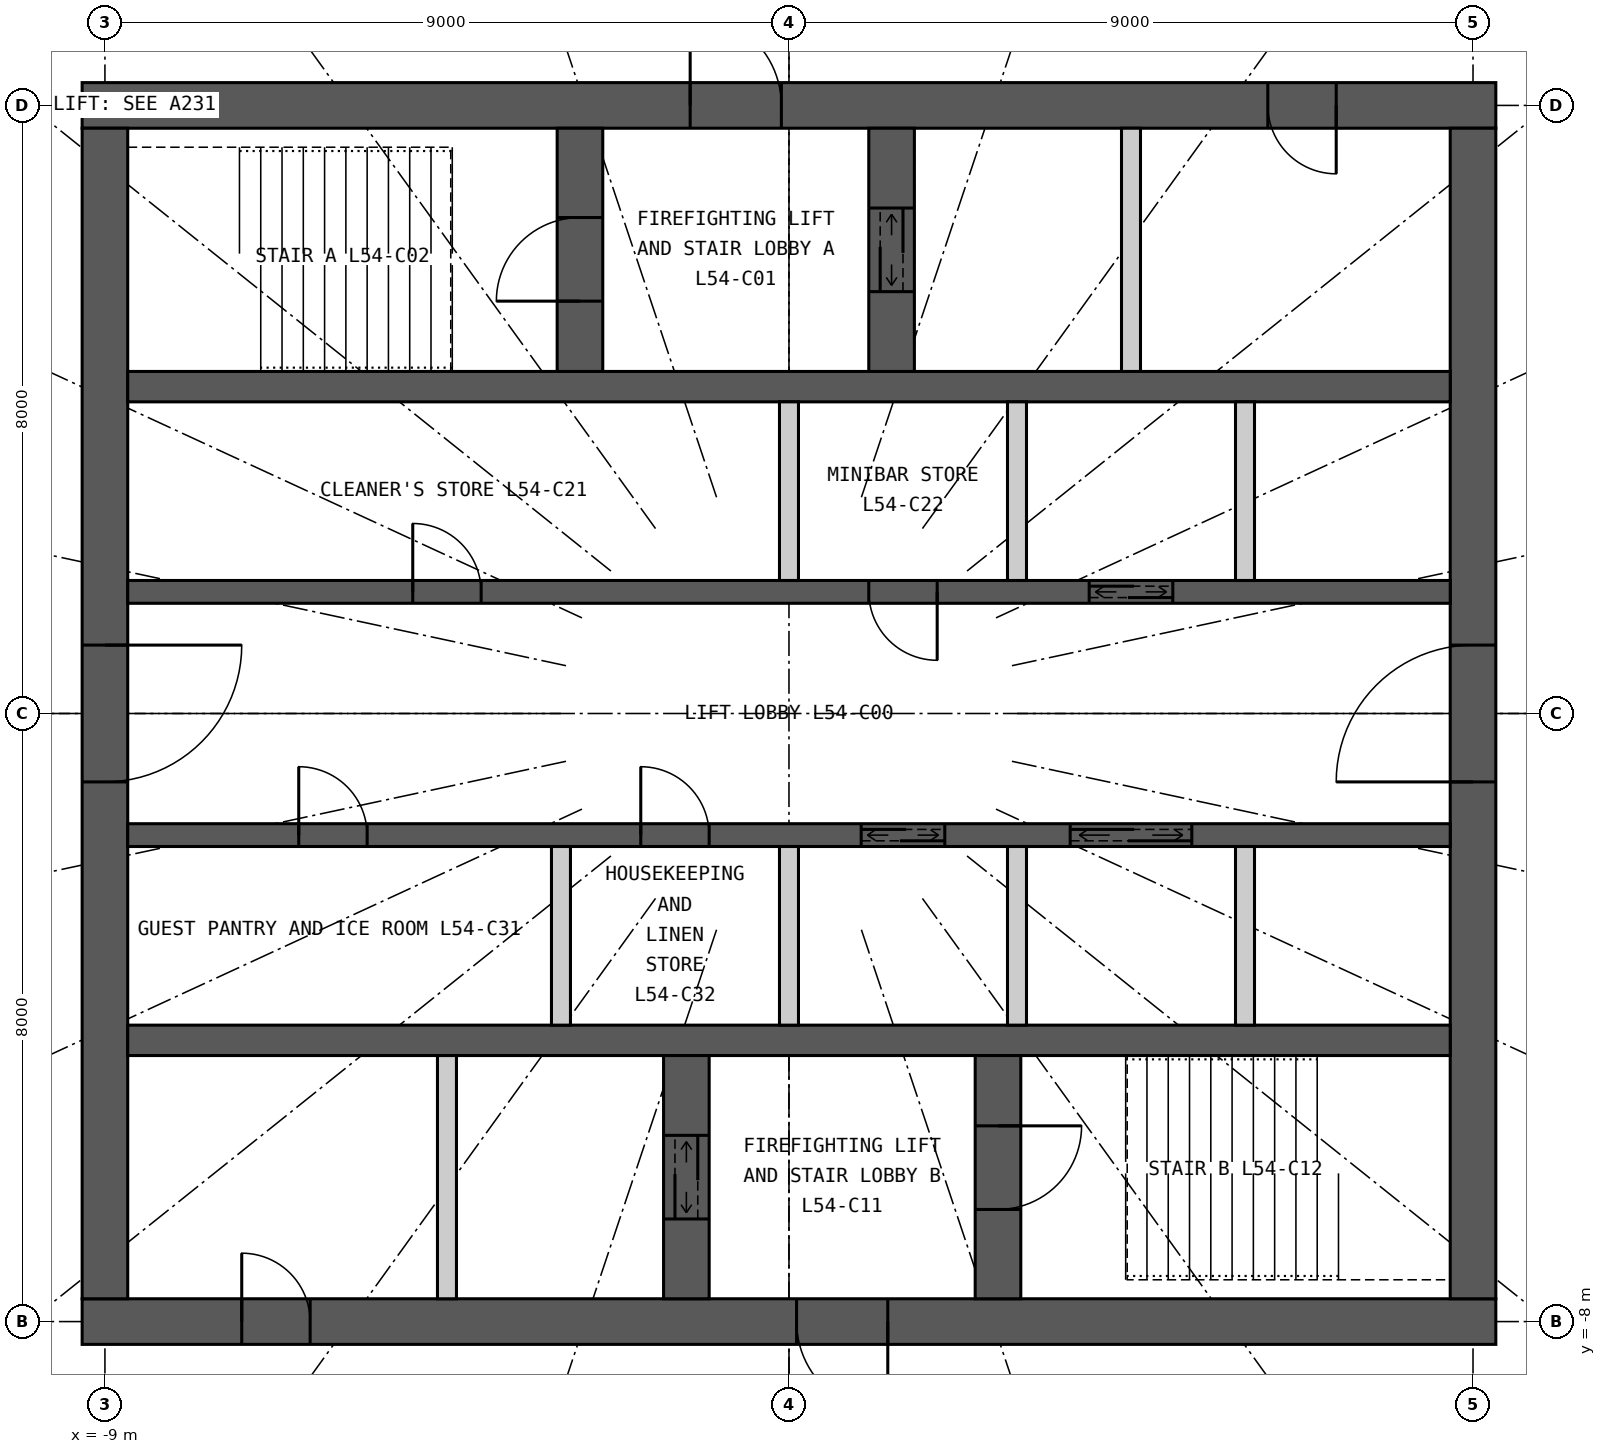
"""IFC4 building model, lengths in metres.
Left out: names, types, materials, properties, quantities, classifications, styles, units other than length and angle.
Written with IfcOpenShell. Run it as: python <this file> out.ifc"""

import sys

from ifc_helpers import new_model, si_unit, direction, frame, frame_2d, origin, place, context, subcontext, project, spatial, rectangle, extrude, element, fill, save


model = new_model("IFC4")
c1 = context("Model", 3, precision=1e-05, world=origin(), true_north=direction((0.0, 1.0)))
c2 = subcontext(c1, "Body", "Model", "MODEL_VIEW")
j1 = project(units=[si_unit("LENGTHUNIT", "METRE"), si_unit("PLANEANGLEUNIT", "RADIAN")], contexts=[c1])
p1 = place(None, origin())
s1 = spatial("IfcSite", under=j1, at=p1, CompositionType="ELEMENT")
p2 = place(p1, origin())
s2 = spatial("IfcBuilding", under=s1, at=p2, CompositionType="ELEMENT")
p3 = place(p2, frame((0.0, 0.0, 202.8)))
s3 = spatial("IfcBuildingStorey", under=s2, at=p3, CompositionType="ELEMENT", Elevation=202.8)
p4 = place(p3, frame((-9.3, 8.0, 0.0), z_axis=(0.0, 0.0, 1.0), x_axis=(1.0, 0.0, 0.0)))
e1 = element("IfcWall", 1, at=p4, inside=s3, PredefinedType="SHEAR", context=c2, shape_type="SweptSolid", body=[
    extrude(rectangle(XDim=18.6, YDim=0.6, at=frame_2d((9.3, 0.0))), origin(), (0.0, 0.0, 1.0), 3.3),
])
p5 = place(p4, frame((8.0, 0.0, 0.0)))
e2 = element("IfcOpeningElement", 2, at=p5, cuts=e1, PredefinedType="OPENING", context=c2, shape_type="SweptSolid", body=[
    extrude(rectangle(XDim=1.2, YDim=2.2, at=frame_2d((0.6, 1.1))), frame((0.0, 0.31, 0.0), z_axis=(0.0, -1.0, 0.0), x_axis=(1.0, 0.0, 0.0)), (0.0, 0.0, 1.0), 0.62),
])
p6 = place(p4, frame((15.6, 0.0, 0.0)))
e3 = element("IfcOpeningElement", 3, at=p6, cuts=e1, PredefinedType="OPENING", context=c2, shape_type="SweptSolid", body=[
    extrude(rectangle(XDim=0.9, YDim=2.2, at=frame_2d((0.45, 1.1))), frame((0.0, 0.31, 0.0), z_axis=(0.0, -1.0, 0.0), x_axis=(1.0, 0.0, 0.0)), (0.0, 0.0, 1.0), 0.62),
])
p7 = place(p3, frame((9.3, -8.0, 0.0), z_axis=(0.0, 0.0, 1.0), x_axis=(-1.0, 0.0, 0.0)))
e4 = element("IfcWall", 4, at=p7, inside=s3, PredefinedType="SHEAR", context=c2, shape_type="SweptSolid", body=[
    extrude(rectangle(XDim=18.6, YDim=0.6, at=frame_2d((9.3, 0.0))), origin(), (0.0, 0.0, 1.0), 3.3),
])
p8 = place(p7, frame((8.0, 0.0, 0.0)))
e5 = element("IfcOpeningElement", 5, at=p8, cuts=e4, PredefinedType="OPENING", context=c2, shape_type="SweptSolid", body=[
    extrude(rectangle(XDim=1.2, YDim=2.2, at=frame_2d((0.6, 1.1))), frame((0.0, 0.31, 0.0), z_axis=(0.0, -1.0, 0.0), x_axis=(1.0, 0.0, 0.0)), (0.0, 0.0, 1.0), 0.62),
])
p9 = place(p7, frame((15.6, 0.0, 0.0)))
e6 = element("IfcOpeningElement", 6, at=p9, cuts=e4, PredefinedType="OPENING", context=c2, shape_type="SweptSolid", body=[
    extrude(rectangle(XDim=0.9, YDim=2.2, at=frame_2d((0.45, 1.1))), frame((0.0, 0.31, 0.0), z_axis=(0.0, -1.0, 0.0), x_axis=(1.0, 0.0, 0.0)), (0.0, 0.0, 1.0), 0.62),
])
p10 = place(p3, frame((9.0, -7.7, 0.0), z_axis=(0.0, 0.0, 1.0), x_axis=(0.0, 1.0, 0.0)))
e7 = element("IfcWall", 7, at=p10, inside=s3, PredefinedType="SHEAR", context=c2, shape_type="SweptSolid", body=[
    extrude(rectangle(XDim=15.4, YDim=0.6, at=frame_2d((7.7, 0.0))), origin(), (0.0, 0.0, 1.0), 3.3),
])
p11 = place(p10, frame((6.8, 0.0, 0.0)))
e8 = element("IfcOpeningElement", 8, at=p11, cuts=e7, PredefinedType="OPENING", context=c2, shape_type="SweptSolid", body=[
    extrude(rectangle(XDim=1.8, YDim=2.2, at=frame_2d((0.9, 1.1))), frame((0.0, 0.31, 0.0), z_axis=(0.0, -1.0, 0.0), x_axis=(1.0, 0.0, 0.0)), (0.0, 0.0, 1.0), 0.62),
])
p12 = place(p3, frame((-9.0, 7.7, 0.0), z_axis=(0.0, 0.0, 1.0), x_axis=(0.0, -1.0, 0.0)))
e9 = element("IfcWall", 9, at=p12, inside=s3, PredefinedType="SHEAR", context=c2, shape_type="SweptSolid", body=[
    extrude(rectangle(XDim=15.4, YDim=0.6, at=frame_2d((7.7, 0.0))), origin(), (0.0, 0.0, 1.0), 3.3),
])
p13 = place(p12, frame((6.8, 0.0, 0.0)))
e10 = element("IfcOpeningElement", 10, at=p13, cuts=e9, PredefinedType="OPENING", context=c2, shape_type="SweptSolid", body=[
    extrude(rectangle(XDim=1.8, YDim=2.2, at=frame_2d((0.9, 1.1))), frame((0.0, 0.31, 0.0), z_axis=(0.0, -1.0, 0.0), x_axis=(1.0, 0.0, 0.0)), (0.0, 0.0, 1.0), 0.62),
])
p14 = place(p3, frame((-8.7, 4.3, 0.0), z_axis=(0.0, 0.0, 1.0), x_axis=(1.0, 0.0, 0.0)))
e11 = element("IfcWall", 11, at=p14, inside=s3, PredefinedType="SHEAR", context=c2, shape_type="SweptSolid", body=[
    extrude(rectangle(XDim=17.4, YDim=0.4, at=frame_2d((8.7, 0.0))), origin(), (0.0, 0.0, 1.0), 3.3),
])
p15 = place(p3, frame((-8.7, 1.6, 0.0), z_axis=(0.0, 0.0, 1.0), x_axis=(1.0, 0.0, 0.0)))
e12 = element("IfcWall", 12, at=p15, inside=s3, PredefinedType="SHEAR", context=c2, shape_type="SweptSolid", body=[
    extrude(rectangle(XDim=17.4, YDim=0.3, at=frame_2d((8.7, 0.0))), origin(), (0.0, 0.0, 1.0), 3.3),
])
p16 = place(p15, frame((12.65, 0.0, 0.0)))
e13 = element("IfcOpeningElement", 13, at=p16, cuts=e12, PredefinedType="OPENING", context=c2, shape_type="SweptSolid", body=[
    extrude(rectangle(XDim=1.1, YDim=2.2, at=frame_2d((0.55, 1.1))), frame((0.0, 0.16, 0.0), z_axis=(0.0, -1.0, 0.0), x_axis=(1.0, 0.0, 0.0)), (0.0, 0.0, 1.0), 0.32),
])
p17 = place(p15, frame((3.75, 0.0, 0.0)))
e14 = element("IfcOpeningElement", 14, at=p17, cuts=e12, PredefinedType="OPENING", context=c2, shape_type="SweptSolid", body=[
    extrude(rectangle(XDim=0.9, YDim=2.2, at=frame_2d((0.45, 1.1))), frame((0.0, 0.16, 0.0), z_axis=(0.0, -1.0, 0.0), x_axis=(1.0, 0.0, 0.0)), (0.0, 0.0, 1.0), 0.32),
])
p18 = place(p15, frame((9.75, 0.0, 0.0)))
e15 = element("IfcOpeningElement", 15, at=p18, cuts=e12, PredefinedType="OPENING", context=c2, shape_type="SweptSolid", body=[
    extrude(rectangle(XDim=0.9, YDim=2.2, at=frame_2d((0.45, 1.1))), frame((0.0, 0.16, 0.0), z_axis=(0.0, -1.0, 0.0), x_axis=(1.0, 0.0, 0.0)), (0.0, 0.0, 1.0), 0.32),
])
p19 = place(p3, frame((-8.7, -4.3, 0.0), z_axis=(0.0, 0.0, 1.0), x_axis=(1.0, 0.0, 0.0)))
e16 = element("IfcWall", 16, at=p19, inside=s3, PredefinedType="SHEAR", context=c2, shape_type="SweptSolid", body=[
    extrude(rectangle(XDim=17.4, YDim=0.4, at=frame_2d((8.7, 0.0))), origin(), (0.0, 0.0, 1.0), 3.3),
])
p20 = place(p3, frame((-8.7, -1.6, 0.0), z_axis=(0.0, 0.0, 1.0), x_axis=(1.0, 0.0, 0.0)))
e17 = element("IfcWall", 17, at=p20, inside=s3, PredefinedType="SHEAR", context=c2, shape_type="SweptSolid", body=[
    extrude(rectangle(XDim=17.4, YDim=0.3, at=frame_2d((8.7, 0.0))), origin(), (0.0, 0.0, 1.0), 3.3),
])
p21 = place(p20, frame((9.65, 0.0, 0.0)))
e18 = element("IfcOpeningElement", 18, at=p21, cuts=e17, PredefinedType="OPENING", context=c2, shape_type="SweptSolid", body=[
    extrude(rectangle(XDim=1.1, YDim=2.2, at=frame_2d((0.55, 1.1))), frame((0.0, 0.16, 0.0), z_axis=(0.0, -1.0, 0.0), x_axis=(1.0, 0.0, 0.0)), (0.0, 0.0, 1.0), 0.32),
])
p22 = place(p20, frame((12.4, 0.0, 0.0)))
e19 = element("IfcOpeningElement", 19, at=p22, cuts=e17, PredefinedType="OPENING", context=c2, shape_type="SweptSolid", body=[
    extrude(rectangle(XDim=1.6, YDim=2.4, at=frame_2d((0.8, 1.2))), frame((0.0, 0.16, 0.0), z_axis=(0.0, -1.0, 0.0), x_axis=(1.0, 0.0, 0.0)), (0.0, 0.0, 1.0), 0.32),
])
p23 = place(p20, frame((2.25, 0.0, 0.0)))
e20 = element("IfcOpeningElement", 20, at=p23, cuts=e17, PredefinedType="OPENING", context=c2, shape_type="SweptSolid", body=[
    extrude(rectangle(XDim=0.9, YDim=2.2, at=frame_2d((0.45, 1.1))), frame((0.0, 0.16, 0.0), z_axis=(0.0, -1.0, 0.0), x_axis=(1.0, 0.0, 0.0)), (0.0, 0.0, 1.0), 0.32),
])
p24 = place(p20, frame((6.75, 0.0, 0.0)))
e21 = element("IfcOpeningElement", 21, at=p24, cuts=e17, PredefinedType="OPENING", context=c2, shape_type="SweptSolid", body=[
    extrude(rectangle(XDim=0.9, YDim=2.2, at=frame_2d((0.45, 1.1))), frame((0.0, 0.16, 0.0), z_axis=(0.0, -1.0, 0.0), x_axis=(1.0, 0.0, 0.0)), (0.0, 0.0, 1.0), 0.32),
])
p25 = place(p3, frame((-2.75, 4.5, 0.0), z_axis=(0.0, 0.0, 1.0), x_axis=(0.0, 1.0, 0.0)))
e22 = element("IfcWall", 22, at=p25, inside=s3, PredefinedType="SHEAR", context=c2, shape_type="SweptSolid", body=[
    extrude(rectangle(XDim=3.2, YDim=0.6, at=frame_2d((1.6, 0.0))), origin(), (0.0, 0.0, 1.0), 3.3),
])
p26 = place(p25, frame((0.925, 0.0, 0.0)))
e23 = element("IfcOpeningElement", 23, at=p26, cuts=e22, PredefinedType="OPENING", context=c2, shape_type="SweptSolid", body=[
    extrude(rectangle(XDim=1.1, YDim=2.2, at=frame_2d((0.55, 1.1))), frame((0.0, 0.31, 0.0), z_axis=(0.0, -1.0, 0.0), x_axis=(1.0, 0.0, 0.0)), (0.0, 0.0, 1.0), 0.62),
])
p27 = place(p3, frame((1.35, 4.5, 0.0), z_axis=(0.0, 0.0, 1.0), x_axis=(0.0, 1.0, 0.0)))
e24 = element("IfcWall", 24, at=p27, inside=s3, PredefinedType="SHEAR", context=c2, shape_type="SweptSolid", body=[
    extrude(rectangle(XDim=3.2, YDim=0.6, at=frame_2d((1.6, 0.0))), origin(), (0.0, 0.0, 1.0), 3.3),
])
p28 = place(p27, frame((1.05, 0.0, 0.0)))
e25 = element("IfcOpeningElement", 25, at=p28, cuts=e24, PredefinedType="OPENING", context=c2, shape_type="SweptSolid", body=[
    extrude(rectangle(XDim=1.1, YDim=2.2, at=frame_2d((0.55, 1.1))), frame((0.0, 0.31, 0.0), z_axis=(0.0, -1.0, 0.0), x_axis=(1.0, 0.0, 0.0)), (0.0, 0.0, 1.0), 0.62),
])
p29 = place(p3, frame((4.5, 4.5, 0.0), z_axis=(0.0, 0.0, 1.0), x_axis=(0.0, 1.0, 0.0)))
e26 = element("IfcWall", 26, at=p29, inside=s3, PredefinedType="PARTITIONING", context=c2, shape_type="SweptSolid", body=[
    extrude(rectangle(XDim=3.2, YDim=0.25, at=frame_2d((1.6, 0.0))), origin(), (0.0, 0.0, 1.0), 3.3),
])
p30 = place(p3, frame((2.75, -7.7, 0.0), z_axis=(0.0, 0.0, 1.0), x_axis=(0.0, 1.0, 0.0)))
e27 = element("IfcWall", 27, at=p30, inside=s3, PredefinedType="SHEAR", context=c2, shape_type="SweptSolid", body=[
    extrude(rectangle(XDim=3.2, YDim=0.6, at=frame_2d((1.6, 0.0))), origin(), (0.0, 0.0, 1.0), 3.3),
])
p31 = place(p30, frame((1.175, 0.0, 0.0)))
e28 = element("IfcOpeningElement", 28, at=p31, cuts=e27, PredefinedType="OPENING", context=c2, shape_type="SweptSolid", body=[
    extrude(rectangle(XDim=1.1, YDim=2.2, at=frame_2d((0.55, 1.1))), frame((0.0, 0.31, 0.0), z_axis=(0.0, -1.0, 0.0), x_axis=(1.0, 0.0, 0.0)), (0.0, 0.0, 1.0), 0.62),
])
p32 = place(p3, frame((-1.35, -7.7, 0.0), z_axis=(0.0, 0.0, 1.0), x_axis=(0.0, 1.0, 0.0)))
e29 = element("IfcWall", 29, at=p32, inside=s3, PredefinedType="SHEAR", context=c2, shape_type="SweptSolid", body=[
    extrude(rectangle(XDim=3.2, YDim=0.6, at=frame_2d((1.6, 0.0))), origin(), (0.0, 0.0, 1.0), 3.3),
])
p33 = place(p32, frame((1.05, 0.0, 0.0)))
e30 = element("IfcOpeningElement", 30, at=p33, cuts=e29, PredefinedType="OPENING", context=c2, shape_type="SweptSolid", body=[
    extrude(rectangle(XDim=1.1, YDim=2.2, at=frame_2d((0.55, 1.1))), frame((0.0, 0.31, 0.0), z_axis=(0.0, -1.0, 0.0), x_axis=(1.0, 0.0, 0.0)), (0.0, 0.0, 1.0), 0.62),
])
p34 = place(p3, frame((-4.5, -7.7, 0.0), z_axis=(0.0, 0.0, 1.0), x_axis=(0.0, 1.0, 0.0)))
e31 = element("IfcWall", 31, at=p34, inside=s3, PredefinedType="PARTITIONING", context=c2, shape_type="SweptSolid", body=[
    extrude(rectangle(XDim=3.2, YDim=0.25, at=frame_2d((1.6, 0.0))), origin(), (0.0, 0.0, 1.0), 3.3),
])
for number, where, z_axis, x_axis in (
    (32, (0.0, 1.75, 0.0), (0.0, 0.0, 1.0), (0.0, 1.0, 0.0)),
    (33, (3.0, 1.75, 0.0), (0.0, 0.0, 1.0), (0.0, 1.0, 0.0)),
    (34, (6.0, 1.75, 0.0), (0.0, 0.0, 1.0), (0.0, 1.0, 0.0)),
    (35, (-3.0, -4.1, 0.0), (0.0, 0.0, 1.0), (0.0, 1.0, 0.0)),
    (36, (0.0, -4.1, 0.0), (0.0, 0.0, 1.0), (0.0, 1.0, 0.0)),
    (37, (3.0, -4.1, 0.0), (0.0, 0.0, 1.0), (0.0, 1.0, 0.0)),
    (38, (6.0, -4.1, 0.0), (0.0, 0.0, 1.0), (0.0, 1.0, 0.0)),
):
    element("IfcWall", number, at=place(p3, frame(where, z_axis=z_axis, x_axis=x_axis)), inside=s3, PredefinedType="PARTITIONING", context=c2, shape_type="SweptSolid", body=[
        extrude(rectangle(XDim=2.35, YDim=0.25, at=frame_2d((1.175, 0.0))), origin(), (0.0, 0.0, 1.0), 3.3),
    ])
p35 = place(p5, origin())
e39 = element("IfcDoor", 39, at=p35, inside=s3, OperationType="SINGLE_SWING_LEFT", PredefinedType="DOOR", context=c2, shape_type="SweptSolid", body=[
    extrude(rectangle(XDim=1.2, YDim=2.2, at=frame_2d((0.6, 1.1))), frame((0.0, 0.025, 0.0), z_axis=(0.0, -1.0, 0.0), x_axis=(1.0, 0.0, 0.0)), (0.0, 0.0, 1.0), 0.05),
])
fill(e2, e39)
p36 = place(p26, origin())
e40 = element("IfcDoor", 40, at=p36, inside=s3, OperationType="SINGLE_SWING_LEFT", PredefinedType="DOOR", context=c2, shape_type="SweptSolid", body=[
    extrude(rectangle(XDim=1.1, YDim=2.2, at=frame_2d((0.55, 1.1))), frame((0.0, 0.025, 0.0), z_axis=(0.0, -1.0, 0.0), x_axis=(1.0, 0.0, 0.0)), (0.0, 0.0, 1.0), 0.05),
])
fill(e23, e40)
p37 = place(p28, origin())
e41 = element("IfcDoor", 41, at=p37, inside=s3, OperationType="DOUBLE_DOOR_SLIDING", PredefinedType="DOOR", context=c2, shape_type="SweptSolid", body=[
    extrude(rectangle(XDim=1.1, YDim=2.2, at=frame_2d((0.55, 1.1))), frame((0.0, 0.025, 0.0), z_axis=(0.0, -1.0, 0.0), x_axis=(1.0, 0.0, 0.0)), (0.0, 0.0, 1.0), 0.05),
])
fill(e25, e41)
p38 = place(p6, origin())
e42 = element("IfcDoor", 42, at=p38, inside=s3, OperationType="SINGLE_SWING_RIGHT", PredefinedType="DOOR", context=c2, shape_type="SweptSolid", body=[
    extrude(rectangle(XDim=0.9, YDim=2.2, at=frame_2d((0.45, 1.1))), frame((0.0, 0.025, 0.0), z_axis=(0.0, -1.0, 0.0), x_axis=(1.0, 0.0, 0.0)), (0.0, 0.0, 1.0), 0.05),
])
fill(e3, e42)
p39 = place(p8, origin())
e43 = element("IfcDoor", 43, at=p39, inside=s3, OperationType="SINGLE_SWING_LEFT", PredefinedType="DOOR", context=c2, shape_type="SweptSolid", body=[
    extrude(rectangle(XDim=1.2, YDim=2.2, at=frame_2d((0.6, 1.1))), frame((0.0, 0.025, 0.0), z_axis=(0.0, -1.0, 0.0), x_axis=(1.0, 0.0, 0.0)), (0.0, 0.0, 1.0), 0.05),
])
fill(e5, e43)
p40 = place(p31, origin())
e44 = element("IfcDoor", 44, at=p40, inside=s3, OperationType="SINGLE_SWING_RIGHT", PredefinedType="DOOR", context=c2, shape_type="SweptSolid", body=[
    extrude(rectangle(XDim=1.1, YDim=2.2, at=frame_2d((0.55, 1.1))), frame((0.0, 0.025, 0.0), z_axis=(0.0, -1.0, 0.0), x_axis=(1.0, 0.0, 0.0)), (0.0, 0.0, 1.0), 0.05),
])
fill(e28, e44)
p41 = place(p33, origin())
e45 = element("IfcDoor", 45, at=p41, inside=s3, OperationType="DOUBLE_DOOR_SLIDING", PredefinedType="DOOR", context=c2, shape_type="SweptSolid", body=[
    extrude(rectangle(XDim=1.1, YDim=2.2, at=frame_2d((0.55, 1.1))), frame((0.0, 0.025, 0.0), z_axis=(0.0, -1.0, 0.0), x_axis=(1.0, 0.0, 0.0)), (0.0, 0.0, 1.0), 0.05),
])
fill(e30, e45)
p42 = place(p9, origin())
e46 = element("IfcDoor", 46, at=p42, inside=s3, OperationType="SINGLE_SWING_RIGHT", PredefinedType="DOOR", context=c2, shape_type="SweptSolid", body=[
    extrude(rectangle(XDim=0.9, YDim=2.2, at=frame_2d((0.45, 1.1))), frame((0.0, 0.025, 0.0), z_axis=(0.0, -1.0, 0.0), x_axis=(1.0, 0.0, 0.0)), (0.0, 0.0, 1.0), 0.05),
])
fill(e6, e46)
p43 = place(p16, origin())
e47 = element("IfcDoor", 47, at=p43, inside=s3, OperationType="DOUBLE_DOOR_SLIDING", PredefinedType="DOOR", context=c2, shape_type="SweptSolid", body=[
    extrude(rectangle(XDim=1.1, YDim=2.2, at=frame_2d((0.55, 1.1))), frame((0.0, 0.025, 0.0), z_axis=(0.0, -1.0, 0.0), x_axis=(1.0, 0.0, 0.0)), (0.0, 0.0, 1.0), 0.05),
])
fill(e13, e47)
p44 = place(p21, origin())
e48 = element("IfcDoor", 48, at=p44, inside=s3, OperationType="DOUBLE_DOOR_SLIDING", PredefinedType="DOOR", context=c2, shape_type="SweptSolid", body=[
    extrude(rectangle(XDim=1.1, YDim=2.2, at=frame_2d((0.55, 1.1))), frame((0.0, 0.025, 0.0), z_axis=(0.0, -1.0, 0.0), x_axis=(1.0, 0.0, 0.0)), (0.0, 0.0, 1.0), 0.05),
])
fill(e18, e48)
p45 = place(p22, origin())
e49 = element("IfcDoor", 49, at=p45, inside=s3, OperationType="DOUBLE_DOOR_SLIDING", PredefinedType="DOOR", context=c2, shape_type="SweptSolid", body=[
    extrude(rectangle(XDim=1.6, YDim=2.4, at=frame_2d((0.8, 1.2))), frame((0.0, 0.025, 0.0), z_axis=(0.0, -1.0, 0.0), x_axis=(1.0, 0.0, 0.0)), (0.0, 0.0, 1.0), 0.05),
])
fill(e19, e49)
p46 = place(p17, origin())
e50 = element("IfcDoor", 50, at=p46, inside=s3, OperationType="SINGLE_SWING_LEFT", PredefinedType="DOOR", context=c2, shape_type="SweptSolid", body=[
    extrude(rectangle(XDim=0.9, YDim=2.2, at=frame_2d((0.45, 1.1))), frame((0.0, 0.025, 0.0), z_axis=(0.0, -1.0, 0.0), x_axis=(1.0, 0.0, 0.0)), (0.0, 0.0, 1.0), 0.05),
])
fill(e14, e50)
p47 = place(p18, origin())
e51 = element("IfcDoor", 51, at=p47, inside=s3, OperationType="SINGLE_SWING_RIGHT", PredefinedType="DOOR", context=c2, shape_type="SweptSolid", body=[
    extrude(rectangle(XDim=0.9, YDim=2.2, at=frame_2d((0.45, 1.1))), frame((0.0, 0.025, 0.0), z_axis=(0.0, -1.0, 0.0), x_axis=(1.0, 0.0, 0.0)), (0.0, 0.0, 1.0), 0.05),
])
fill(e15, e51)
p48 = place(p23, origin())
e52 = element("IfcDoor", 52, at=p48, inside=s3, OperationType="SINGLE_SWING_LEFT", PredefinedType="DOOR", context=c2, shape_type="SweptSolid", body=[
    extrude(rectangle(XDim=0.9, YDim=2.2, at=frame_2d((0.45, 1.1))), frame((0.0, 0.025, 0.0), z_axis=(0.0, -1.0, 0.0), x_axis=(1.0, 0.0, 0.0)), (0.0, 0.0, 1.0), 0.05),
])
fill(e20, e52)
p49 = place(p24, origin())
e53 = element("IfcDoor", 53, at=p49, inside=s3, OperationType="SINGLE_SWING_LEFT", PredefinedType="DOOR", context=c2, shape_type="SweptSolid", body=[
    extrude(rectangle(XDim=0.9, YDim=2.2, at=frame_2d((0.45, 1.1))), frame((0.0, 0.025, 0.0), z_axis=(0.0, -1.0, 0.0), x_axis=(1.0, 0.0, 0.0)), (0.0, 0.0, 1.0), 0.05),
])
fill(e21, e53)
p50 = place(p11, origin())
e54 = element("IfcDoor", 54, at=p50, inside=s3, OperationType="DOUBLE_DOOR_DOUBLE_SWING", PredefinedType="DOOR", context=c2, shape_type="SweptSolid", body=[
    extrude(rectangle(XDim=1.8, YDim=2.2, at=frame_2d((0.9, 1.1))), frame((0.0, 0.025, 0.0), z_axis=(0.0, -1.0, 0.0), x_axis=(1.0, 0.0, 0.0)), (0.0, 0.0, 1.0), 0.05),
])
fill(e8, e54)
p51 = place(p13, origin())
e55 = element("IfcDoor", 55, at=p51, inside=s3, OperationType="DOUBLE_DOOR_DOUBLE_SWING", PredefinedType="DOOR", context=c2, shape_type="SweptSolid", body=[
    extrude(rectangle(XDim=1.8, YDim=2.2, at=frame_2d((0.9, 1.1))), frame((0.0, 0.025, 0.0), z_axis=(0.0, -1.0, 0.0), x_axis=(1.0, 0.0, 0.0)), (0.0, 0.0, 1.0), 0.05),
])
fill(e10, e55)
save(model, sys.argv[1])
